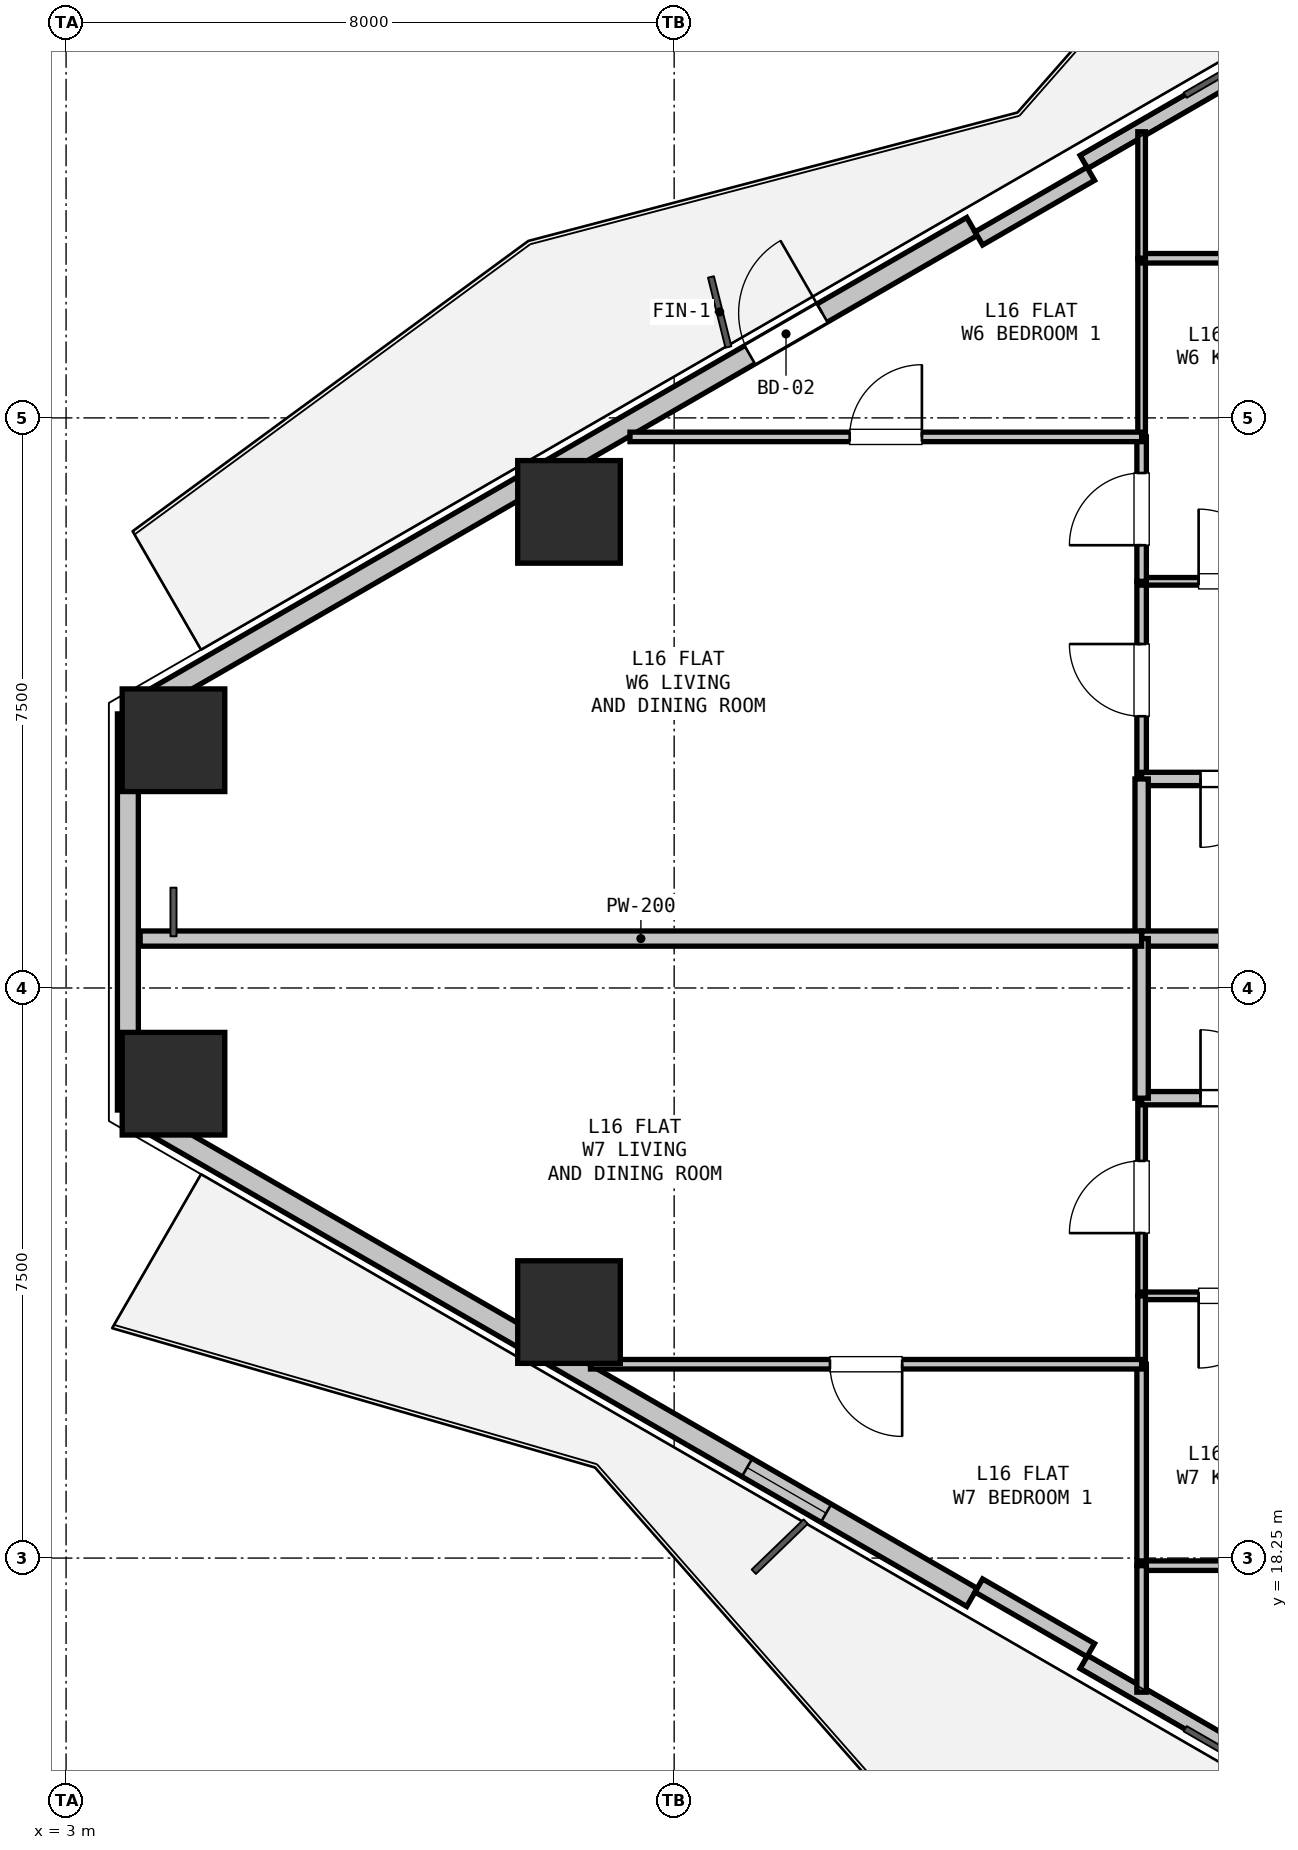
"""IFC4 building model, lengths in metres.
Left out: names, types, materials, properties, quantities, classifications, styles, units other than length and angle.
Written with IfcOpenShell. Run it as: python <this file> out.ifc"""

import sys

from ifc_helpers import new_model, si_unit, direction, frame, frame_2d, origin, origin_2d, place, context, subcontext, project, spatial, rectangle, hollow_rectangle, extrude, element, fill, save


model = new_model("IFC4")
c1 = context("Model", 3, precision=1e-05, world=origin(), true_north=direction((0.0, 1.0)))
c2 = subcontext(c1, "Body", "Model", "MODEL_VIEW")
j1 = project(units=[si_unit("LENGTHUNIT", "METRE"), si_unit("PLANEANGLEUNIT", "RADIAN")], contexts=[c1])
p1 = place(None, origin())
s1 = spatial("IfcSite", under=j1, at=p1, CompositionType="ELEMENT")
p2 = place(p1, origin())
s2 = spatial("IfcBuilding", under=s1, at=p2, CompositionType="ELEMENT")
p3 = place(p2, frame((0.0, 0.0, 58.8)))
s3 = spatial("IfcBuildingStorey", under=s2, at=p3, CompositionType="ELEMENT", Elevation=58.8)
for number, where, z_axis, x_axis in (
    (1, (4.413, 29.009, 0.0), (0.0, 0.0, 1.0), (1.0, 0.0, 0.0)),
    (2, (9.617, 32.014, 0.0), (0.0, 0.0, 1.0), (1.0, 0.0, 0.0)),
    (3, (9.617, 21.486, 0.0), (0.0, 0.0, 1.0), (1.0, 0.0, 0.0)),
    (4, (4.413, 24.491, 0.0), (0.0, 0.0, 1.0), (1.0, 0.0, 0.0)),
):
    element("IfcColumn", number, at=place(p3, frame(where, z_axis=z_axis, x_axis=x_axis)), inside=s3, PredefinedType="COLUMN", context=c2, shape_type="SweptSolid", body=[
        extrude(hollow_rectangle(XDim=1.35, YDim=1.35, WallThickness=0.036, at=origin_2d()), origin(), (0.0, 0.0, 1.0), 3.3),
    ])
p4 = place(p3, frame((3.813, 24.144, 0.0), z_axis=(0.0, 0.0, 1.0), x_axis=(0.0, 1.0, 0.0)))
e5 = element("IfcWall", 5, at=p4, inside=s3, PredefinedType="SOLIDWALL", context=c2, shape_type="SweptSolid", body=[
    extrude(rectangle(XDim=5.211, YDim=0.275, at=frame_2d((2.606, 0.0))), origin(), (0.0, 0.0, 1.0), 2.64),
])
p5 = place(p3, frame((3.943, 29.431, 0.0), z_axis=(0.0, 0.0, 1.0), x_axis=(0.866027105532, 0.499997052475, 0.0)))
e6 = element("IfcWall", 6, at=p5, inside=s3, PredefinedType="SOLIDWALL", context=c2, shape_type="SweptSolid", body=[
    extrude(rectangle(XDim=12.673, YDim=0.275, at=frame_2d((6.336, 0.0))), origin(), (0.0, 0.0, 1.0), 2.64),
])
p6 = place(p5, frame((9.298, 0.0, 0.0)))
e7 = element("IfcOpeningElement", 7, at=p6, cuts=e6, PredefinedType="OPENING", context=c2, shape_type="SweptSolid", body=[
    extrude(rectangle(XDim=1.1, YDim=2.1, at=frame_2d((0.55, 1.05))), frame((0.0, 0.147, 0.0), z_axis=(0.0, -1.0, 0.0), x_axis=(1.0, 0.0, 0.0)), (0.0, 0.0, 1.0), 0.295),
])
p7 = place(p3, frame((16.39, 36.617, 0.0), z_axis=(0.0, 0.0, 1.0), x_axis=(0.866027351828, 0.499996625875, 0.0)))
e8 = element("IfcWall", 8, at=p7, inside=s3, PredefinedType="PARAPET", context=c2, shape_type="SweptSolid", body=[
    extrude(rectangle(XDim=11.973, YDim=0.2, at=frame_2d((5.987, 0.0))), origin(), (0.0, 0.0, 1.0), 0.2),
])
p8 = place(p3, frame((15.008, 35.611, 0.0), z_axis=(0.0, 0.0, 1.0), x_axis=(0.86605165483, 0.499954529098, 0.0)))
e9 = element("IfcWall", 9, at=p8, inside=s3, PredefinedType="PARAPET", context=c2, shape_type="SweptSolid", body=[
    extrude(rectangle(XDim=1.7, YDim=0.2, at=frame_2d((0.85, 0.0))), origin(), (0.0, 0.0, 1.0), 2.64),
])
p9 = place(p3, frame((26.76, 10.896, 0.0), z_axis=(0.0, 0.0, 1.0), x_axis=(-0.866027351828, 0.499996625875, 0.0)))
e10 = element("IfcWall", 10, at=p9, inside=s3, PredefinedType="PARAPET", context=c2, shape_type="SweptSolid", body=[
    extrude(rectangle(XDim=11.973, YDim=0.2, at=frame_2d((5.987, 0.0))), origin(), (0.0, 0.0, 1.0), 0.2),
])
p10 = place(p3, frame((14.918, 17.733, 0.0), z_axis=(0.0, 0.0, 1.0), x_axis=(-0.866027105532, 0.499997052475, 0.0)))
e11 = element("IfcWall", 11, at=p10, inside=s3, PredefinedType="SOLIDWALL", context=c2, shape_type="SweptSolid", body=[
    extrude(rectangle(XDim=12.673, YDim=0.275, at=frame_2d((6.336, 0.0))), origin(), (0.0, 0.0, 1.0), 2.64),
])
p11 = place(p10, frame((2.216, 0.0, 0.9)))
e12 = element("IfcOpeningElement", 12, at=p11, cuts=e11, PredefinedType="OPENING", context=c2, shape_type="SweptSolid", body=[
    extrude(rectangle(XDim=1.2, YDim=1.4, at=frame_2d((0.6, 0.7))), frame((0.0, 0.147, 0.0), z_axis=(0.0, -1.0, 0.0), x_axis=(1.0, 0.0, 0.0)), (0.0, 0.0, 1.0), 0.295),
])
p12 = place(p3, frame((16.48, 17.039, 0.0), z_axis=(0.0, 0.0, 1.0), x_axis=(-0.86605165483, 0.499954529098, 0.0)))
e13 = element("IfcWall", 13, at=p12, inside=s3, PredefinedType="PARAPET", context=c2, shape_type="SweptSolid", body=[
    extrude(rectangle(XDim=1.7, YDim=0.2, at=frame_2d((0.85, 0.0))), origin(), (0.0, 0.0, 1.0), 2.64),
])
p13 = place(p3, frame((17.15, 28.5, 0.0), z_axis=(0.0, 0.0, 1.0), x_axis=(0.0, 1.0, 0.0)))
e14 = element("IfcWall", 14, at=p13, inside=s3, PredefinedType="PARTITIONING", context=c2, shape_type="SweptSolid", body=[
    extrude(rectangle(XDim=2.6, YDim=0.125, at=frame_2d((1.3, 0.0))), origin(), (0.0, 0.0, 1.0), 3.02),
])
p14 = place(p13, frame((0.825, 0.0, 0.0)))
e15 = element("IfcOpeningElement", 15, at=p14, cuts=e14, PredefinedType="OPENING", context=c2, shape_type="SweptSolid", body=[
    extrude(rectangle(XDim=0.95, YDim=2.1, at=frame_2d((0.475, 1.05))), frame((0.0, 0.073, 0.0), z_axis=(0.0, -1.0, 0.0), x_axis=(1.0, 0.0, 0.0)), (0.0, 0.0, 1.0), 0.145),
])
p15 = place(p3, frame((17.15, 31.1, 0.0), z_axis=(0.0, 0.0, 1.0), x_axis=(1.0, 0.0, 0.0)))
e16 = element("IfcWall", 16, at=p15, inside=s3, PredefinedType="PARTITIONING", context=c2, shape_type="SweptSolid", body=[
    extrude(rectangle(XDim=2.45, YDim=0.1, at=frame_2d((1.225, 0.0))), origin(), (0.0, 0.0, 1.0), 3.02),
])
p16 = place(p15, frame((0.75, 0.0, 0.0)))
e17 = element("IfcOpeningElement", 17, at=p16, cuts=e16, PredefinedType="OPENING", context=c2, shape_type="SweptSolid", body=[
    extrude(rectangle(XDim=0.95, YDim=2.1, at=frame_2d((0.475, 1.05))), frame((0.0, 0.06, 0.0), z_axis=(0.0, -1.0, 0.0), x_axis=(1.0, 0.0, 0.0)), (0.0, 0.0, 1.0), 0.12),
])
p17 = place(p3, frame((19.6, 28.5, 0.0), z_axis=(0.0, 0.0, 1.0), x_axis=(-1.0, 0.0, 0.0)))
e18 = element("IfcWall", 18, at=p17, inside=s3, PredefinedType="PLUMBINGWALL", context=c2, shape_type="SweptSolid", body=[
    extrude(rectangle(XDim=2.45, YDim=0.175, at=frame_2d((1.225, 0.0))), origin(), (0.0, 0.0, 1.0), 3.02),
])
p18 = place(p17, frame((0.775, 0.0, 0.0)))
e19 = element("IfcOpeningElement", 19, at=p18, cuts=e18, PredefinedType="OPENING", context=c2, shape_type="SweptSolid", body=[
    extrude(rectangle(XDim=0.9, YDim=2.1, at=frame_2d((0.45, 1.05))), frame((0.0, 0.097, 0.0), z_axis=(0.0, -1.0, 0.0), x_axis=(1.0, 0.0, 0.0)), (0.0, 0.0, 1.0), 0.195),
])
p19 = place(p3, frame((17.15, 21.7, 0.0), z_axis=(0.0, 0.0, 1.0), x_axis=(0.0, 1.0, 0.0)))
e20 = element("IfcWall", 20, at=p19, inside=s3, PredefinedType="PARTITIONING", context=c2, shape_type="SweptSolid", body=[
    extrude(rectangle(XDim=2.6, YDim=0.1, at=frame_2d((1.3, 0.0))), origin(), (0.0, 0.0, 1.0), 3.02),
])
p20 = place(p19, frame((0.825, 0.0, 0.0)))
e21 = element("IfcOpeningElement", 21, at=p20, cuts=e20, PredefinedType="OPENING", context=c2, shape_type="SweptSolid", body=[
    extrude(rectangle(XDim=0.95, YDim=2.1, at=frame_2d((0.475, 1.05))), frame((0.0, 0.06, 0.0), z_axis=(0.0, -1.0, 0.0), x_axis=(1.0, 0.0, 0.0)), (0.0, 0.0, 1.0), 0.12),
])
p21 = place(p3, frame((17.15, 24.3, 0.0), z_axis=(0.0, 0.0, 1.0), x_axis=(1.0, 0.0, 0.0)))
e22 = element("IfcWall", 22, at=p21, inside=s3, PredefinedType="PLUMBINGWALL", context=c2, shape_type="SweptSolid", body=[
    extrude(rectangle(XDim=2.45, YDim=0.175, at=frame_2d((1.225, 0.0))), origin(), (0.0, 0.0, 1.0), 3.02),
])
p22 = place(p21, frame((0.775, 0.0, 0.0)))
e23 = element("IfcOpeningElement", 23, at=p22, cuts=e22, PredefinedType="OPENING", context=c2, shape_type="SweptSolid", body=[
    extrude(rectangle(XDim=0.9, YDim=2.1, at=frame_2d((0.45, 1.05))), frame((0.0, 0.097, 0.0), z_axis=(0.0, -1.0, 0.0), x_axis=(1.0, 0.0, 0.0)), (0.0, 0.0, 1.0), 0.195),
])
p23 = place(p3, frame((19.6, 21.7, 0.0), z_axis=(0.0, 0.0, 1.0), x_axis=(-1.0, 0.0, 0.0)))
e24 = element("IfcWall", 24, at=p23, inside=s3, PredefinedType="PARTITIONING", context=c2, shape_type="SweptSolid", body=[
    extrude(rectangle(XDim=2.45, YDim=0.1, at=frame_2d((1.225, 0.0))), origin(), (0.0, 0.0, 1.0), 2.317),
])
p24 = place(p23, frame((0.75, 0.0, 0.0)))
e25 = element("IfcOpeningElement", 25, at=p24, cuts=e24, PredefinedType="OPENING", context=c2, shape_type="SweptSolid", body=[
    extrude(rectangle(XDim=0.95, YDim=2.1, at=frame_2d((0.475, 1.05))), frame((0.0, 0.06, 0.0), z_axis=(0.0, -1.0, 0.0), x_axis=(1.0, 0.0, 0.0)), (0.0, 0.0, 1.0), 0.12),
])
p25 = place(p3, frame((17.15, 26.4, 0.0), z_axis=(0.0, 0.0, 1.0), x_axis=(0.0, 1.0, 0.0)))
e26 = element("IfcWall", 26, at=p25, inside=s3, PredefinedType="PLUMBINGWALL", context=c2, shape_type="SweptSolid", body=[
    extrude(rectangle(XDim=2.1, YDim=0.175, at=frame_2d((1.05, 0.0))), origin(), (0.0, 0.0, 1.0), 3.02),
])
p26 = place(p3, frame((19.6, 26.4, 0.0), z_axis=(0.0, 0.0, 1.0), x_axis=(-1.0, 0.0, 0.0)))
e27 = element("IfcWall", 27, at=p26, inside=s3, PredefinedType="PARTITIONING", context=c2, shape_type="SweptSolid", body=[
    extrude(rectangle(XDim=2.45, YDim=0.2, at=frame_2d((1.225, 0.0))), origin(), (0.0, 0.0, 1.0), 3.02),
])
p27 = place(p3, frame((17.15, 31.1, 0.0), z_axis=(0.0, 0.0, 1.0), x_axis=(0.0, 1.0, 0.0)))
e28 = element("IfcWall", 28, at=p27, inside=s3, PredefinedType="PARTITIONING", context=c2, shape_type="SweptSolid", body=[
    extrude(rectangle(XDim=1.9, YDim=0.125, at=frame_2d((0.95, 0.0))), origin(), (0.0, 0.0, 1.0), 2.317),
])
p28 = place(p27, frame((0.475, 0.0, 0.0)))
e29 = element("IfcOpeningElement", 29, at=p28, cuts=e28, PredefinedType="OPENING", context=c2, shape_type="SweptSolid", body=[
    extrude(rectangle(XDim=0.95, YDim=2.1, at=frame_2d((0.475, 1.05))), frame((0.0, 0.073, 0.0), z_axis=(0.0, -1.0, 0.0), x_axis=(1.0, 0.0, 0.0)), (0.0, 0.0, 1.0), 0.145),
])
p29 = place(p3, frame((17.15, 33.0, 0.0), z_axis=(0.0, 0.0, 1.0), x_axis=(0.0, 1.0, 0.0)))
e30 = element("IfcWall", 30, at=p29, inside=s3, PredefinedType="PARTITIONING", context=c2, shape_type="SweptSolid", body=[
    extrude(rectangle(XDim=2.35, YDim=0.1, at=frame_2d((1.175, 0.0))), origin(), (0.0, 0.0, 1.0), 3.02),
])
p30 = place(p3, frame((17.15, 35.35, 0.0), z_axis=(0.0, 0.0, 1.0), x_axis=(1.0, 0.0, 0.0)))
e31 = element("IfcWall", 31, at=p30, inside=s3, PredefinedType="PARTITIONING", context=c2, shape_type="SweptSolid", body=[
    extrude(rectangle(XDim=2.45, YDim=0.125, at=frame_2d((1.225, 0.0))), origin(), (0.0, 0.0, 1.0), 3.02),
])
p31 = place(p3, frame((17.15, 24.3, 0.0), z_axis=(0.0, 0.0, 1.0), x_axis=(0.0, 1.0, 0.0)))
e32 = element("IfcWall", 32, at=p31, inside=s3, PredefinedType="PLUMBINGWALL", context=c2, shape_type="SweptSolid", body=[
    extrude(rectangle(XDim=2.1, YDim=0.175, at=frame_2d((1.05, 0.0))), origin(), (0.0, 0.0, 1.0), 3.02),
])
p32 = place(p3, frame((17.15, 18.15, 0.0), z_axis=(0.0, 0.0, 1.0), x_axis=(0.0, 1.0, 0.0)))
e33 = element("IfcWall", 33, at=p32, inside=s3, PredefinedType="PARTITIONING", context=c2, shape_type="SweptSolid", body=[
    extrude(rectangle(XDim=2.65, YDim=0.125, at=frame_2d((1.325, 0.0))), origin(), (0.0, 0.0, 1.0), 3.02),
])
p33 = place(p3, frame((17.15, 20.8, 0.0), z_axis=(0.0, 0.0, 1.0), x_axis=(0.0, 1.0, 0.0)))
e34 = element("IfcWall", 34, at=p33, inside=s3, PredefinedType="PARTITIONING", context=c2, shape_type="SweptSolid", body=[
    extrude(rectangle(XDim=0.9, YDim=0.1, at=frame_2d((0.45, 0.0))), origin(), (0.0, 0.0, 1.0), 2.317),
])
p34 = place(p3, frame((19.6, 18.15, 0.0), z_axis=(0.0, 0.0, 1.0), x_axis=(-1.0, 0.0, 0.0)))
e35 = element("IfcWall", 35, at=p34, inside=s3, PredefinedType="PARTITIONING", context=c2, shape_type="SweptSolid", body=[
    extrude(rectangle(XDim=2.45, YDim=0.125, at=frame_2d((1.225, 0.0))), origin(), (0.0, 0.0, 1.0), 3.02),
])
p35 = place(p3, frame((10.419, 33.0, 0.0), z_axis=(0.0, 0.0, 1.0), x_axis=(1.0, 0.0, 0.0)))
e36 = element("IfcWall", 36, at=p35, inside=s3, PredefinedType="PARTITIONING", context=c2, shape_type="SweptSolid", body=[
    extrude(rectangle(XDim=6.731, YDim=0.125, at=frame_2d((3.365, 0.0))), origin(), (0.0, 0.0, 1.0), 2.365),
])
p36 = place(p35, frame((2.89, 0.0, 0.0)))
e37 = element("IfcOpeningElement", 37, at=p36, cuts=e36, PredefinedType="OPENING", context=c2, shape_type="SweptSolid", body=[
    extrude(rectangle(XDim=0.95, YDim=2.1, at=frame_2d((0.475, 1.05))), frame((0.0, 0.073, 0.0), z_axis=(0.0, -1.0, 0.0), x_axis=(1.0, 0.0, 0.0)), (0.0, 0.0, 1.0), 0.145),
])
p37 = place(p3, frame((17.15, 26.4, 0.0), z_axis=(0.0, 0.0, 1.0), x_axis=(-1.0, 0.0, 0.0)))
e38 = element("IfcWall", 38, at=p37, inside=s3, PredefinedType="PARTITIONING", context=c2, shape_type="SweptSolid", body=[
    extrude(rectangle(XDim=13.175, YDim=0.2, at=frame_2d((6.588, 0.0))), origin(), (0.0, 0.0, 1.0), 2.63),
])
p38 = place(p3, frame((3.813, 29.356, 0.0), z_axis=(0.0, 0.0, 1.0), x_axis=(0.866131372301, 0.499816412211, 0.0)))
e39 = element("IfcWall", 39, at=p38, inside=s3, PredefinedType="PARTITIONING", context=c2, shape_type="SweptSolid", body=[
    extrude(rectangle(XDim=0.15, YDim=0.125, at=frame_2d((0.075, 0.0))), origin(), (0.0, 0.0, 1.0), 3.02),
])
p39 = place(p3, frame((17.15, 37.014, 0.0), z_axis=(0.0, 0.0, 1.0), x_axis=(0.0, -1.0, 0.0)))
e40 = element("IfcWall", 40, at=p39, inside=s3, PredefinedType="PARTITIONING", context=c2, shape_type="SweptSolid", body=[
    extrude(rectangle(XDim=1.664, YDim=0.1, at=frame_2d((0.832, 0.0))), origin(), (0.0, 0.0, 1.0), 2.365),
])
p40 = place(p3, frame((17.15, 20.8, 0.0), z_axis=(0.0, 0.0, 1.0), x_axis=(-1.0, 0.0, 0.0)))
e41 = element("IfcWall", 41, at=p40, inside=s3, PredefinedType="PARTITIONING", context=c2, shape_type="SweptSolid", body=[
    extrude(rectangle(XDim=7.25, YDim=0.125, at=frame_2d((3.625, 0.0))), origin(), (0.0, 0.0, 1.0), 2.365),
])
p41 = place(p40, frame((3.15, 0.0, 0.0)))
e42 = element("IfcOpeningElement", 42, at=p41, cuts=e41, PredefinedType="OPENING", context=c2, shape_type="SweptSolid", body=[
    extrude(rectangle(XDim=0.95, YDim=2.1, at=frame_2d((0.475, 1.05))), frame((0.0, 0.073, 0.0), z_axis=(0.0, -1.0, 0.0), x_axis=(1.0, 0.0, 0.0)), (0.0, 0.0, 1.0), 0.145),
])
p42 = place(p3, frame((3.943, 24.069, 0.0), z_axis=(0.0, 0.0, 1.0), x_axis=(-0.866131372301, 0.499816412211, 0.0)))
e43 = element("IfcWall", 43, at=p42, inside=s3, PredefinedType="PARTITIONING", context=c2, shape_type="SweptSolid", body=[
    extrude(rectangle(XDim=0.15, YDim=0.1, at=frame_2d((0.075, 0.0))), origin(), (0.0, 0.0, 1.0), 3.02),
])
p43 = place(p3, frame((17.15, 18.15, 0.0), z_axis=(0.0, 0.0, 1.0), x_axis=(0.0, -1.0, 0.0)))
e44 = element("IfcWall", 44, at=p43, inside=s3, PredefinedType="PARTITIONING", context=c2, shape_type="SweptSolid", body=[
    extrude(rectangle(XDim=1.664, YDim=0.125, at=frame_2d((0.832, 0.0))), origin(), (0.0, 0.0, 1.0), 2.365),
])
p44 = place(p6, origin())
e45 = element("IfcDoor", 45, at=p44, inside=s3, OperationType="SINGLE_SWING_RIGHT", PredefinedType="DOOR", context=c2, shape_type="SweptSolid", body=[
    extrude(rectangle(XDim=1.1, YDim=2.1, at=frame_2d((0.55, 1.05))), frame((0.0, 0.025, 0.0), z_axis=(0.0, -1.0, 0.0), x_axis=(1.0, 0.0, 0.0)), (0.0, 0.0, 1.0), 0.05),
])
fill(e7, e45)
p45 = place(p11, origin())
e46 = element("IfcWindow", 46, at=p45, inside=s3, PartitioningType="SINGLE_PANEL", PredefinedType="WINDOW", context=c2, shape_type="SweptSolid", body=[
    extrude(rectangle(XDim=1.2, YDim=1.4, at=frame_2d((0.6, 0.7))), frame((0.0, 0.03, 0.0), z_axis=(0.0, -1.0, 0.0), x_axis=(1.0, 0.0, 0.0)), (0.0, 0.0, 1.0), 0.06),
])
fill(e12, e46)
p46 = place(p18, origin())
e47 = element("IfcDoor", 47, at=p46, inside=s3, OperationType="SINGLE_SWING_RIGHT", PredefinedType="DOOR", context=c2, shape_type="SweptSolid", body=[
    extrude(rectangle(XDim=0.9, YDim=2.1, at=frame_2d((0.45, 1.05))), frame((0.0, 0.025, 0.0), z_axis=(0.0, -1.0, 0.0), x_axis=(1.0, 0.0, 0.0)), (0.0, 0.0, 1.0), 0.05),
])
fill(e19, e47)
p47 = place(p16, origin())
e48 = element("IfcDoor", 48, at=p47, inside=s3, OperationType="SINGLE_SWING_LEFT", PredefinedType="DOOR", context=c2, shape_type="SweptSolid", body=[
    extrude(rectangle(XDim=0.95, YDim=2.1, at=frame_2d((0.475, 1.05))), frame((0.0, 0.025, 0.0), z_axis=(0.0, -1.0, 0.0), x_axis=(1.0, 0.0, 0.0)), (0.0, 0.0, 1.0), 0.05),
])
fill(e17, e48)
p48 = place(p14, origin())
e49 = element("IfcDoor", 49, at=p48, inside=s3, OperationType="SINGLE_SWING_RIGHT", PredefinedType="DOOR", context=c2, shape_type="SweptSolid", body=[
    extrude(rectangle(XDim=0.95, YDim=2.1, at=frame_2d((0.475, 1.05))), frame((0.0, 0.025, 0.0), z_axis=(0.0, -1.0, 0.0), x_axis=(1.0, 0.0, 0.0)), (0.0, 0.0, 1.0), 0.05),
])
fill(e15, e49)
p49 = place(p22, origin())
e50 = element("IfcDoor", 50, at=p49, inside=s3, OperationType="SINGLE_SWING_LEFT", PredefinedType="DOOR", context=c2, shape_type="SweptSolid", body=[
    extrude(rectangle(XDim=0.9, YDim=2.1, at=frame_2d((0.45, 1.05))), frame((0.0, 0.025, 0.0), z_axis=(0.0, -1.0, 0.0), x_axis=(1.0, 0.0, 0.0)), (0.0, 0.0, 1.0), 0.05),
])
fill(e23, e50)
p50 = place(p24, origin())
e51 = element("IfcDoor", 51, at=p50, inside=s3, OperationType="SINGLE_SWING_RIGHT", PredefinedType="DOOR", context=c2, shape_type="SweptSolid", body=[
    extrude(rectangle(XDim=0.95, YDim=2.1, at=frame_2d((0.475, 1.05))), frame((0.0, 0.025, 0.0), z_axis=(0.0, -1.0, 0.0), x_axis=(1.0, 0.0, 0.0)), (0.0, 0.0, 1.0), 0.05),
])
fill(e25, e51)
p51 = place(p20, origin())
e52 = element("IfcDoor", 52, at=p51, inside=s3, OperationType="SINGLE_SWING_LEFT", PredefinedType="DOOR", context=c2, shape_type="SweptSolid", body=[
    extrude(rectangle(XDim=0.95, YDim=2.1, at=frame_2d((0.475, 1.05))), frame((0.0, 0.025, 0.0), z_axis=(0.0, -1.0, 0.0), x_axis=(1.0, 0.0, 0.0)), (0.0, 0.0, 1.0), 0.05),
])
fill(e21, e52)
p52 = place(p28, origin())
e53 = element("IfcDoor", 53, at=p52, inside=s3, OperationType="SINGLE_SWING_LEFT", PredefinedType="DOOR", context=c2, shape_type="SweptSolid", body=[
    extrude(rectangle(XDim=0.95, YDim=2.1, at=frame_2d((0.475, 1.05))), frame((0.0, 0.025, 0.0), z_axis=(0.0, -1.0, 0.0), x_axis=(1.0, 0.0, 0.0)), (0.0, 0.0, 1.0), 0.05),
])
fill(e29, e53)
p53 = place(p36, origin())
e54 = element("IfcDoor", 54, at=p53, inside=s3, OperationType="SINGLE_SWING_RIGHT", PredefinedType="DOOR", context=c2, shape_type="SweptSolid", body=[
    extrude(rectangle(XDim=0.95, YDim=2.1, at=frame_2d((0.475, 1.05))), frame((0.0, 0.025, 0.0), z_axis=(0.0, -1.0, 0.0), x_axis=(1.0, 0.0, 0.0)), (0.0, 0.0, 1.0), 0.05),
])
fill(e37, e54)
p54 = place(p41, origin())
e55 = element("IfcDoor", 55, at=p54, inside=s3, OperationType="SINGLE_SWING_LEFT", PredefinedType="DOOR", context=c2, shape_type="SweptSolid", body=[
    extrude(rectangle(XDim=0.95, YDim=2.1, at=frame_2d((0.475, 1.05))), frame((0.0, 0.025, 0.0), z_axis=(0.0, -1.0, 0.0), x_axis=(1.0, 0.0, 0.0)), (0.0, 0.0, 1.0), 0.05),
])
fill(e42, e55)
save(model, sys.argv[1])
